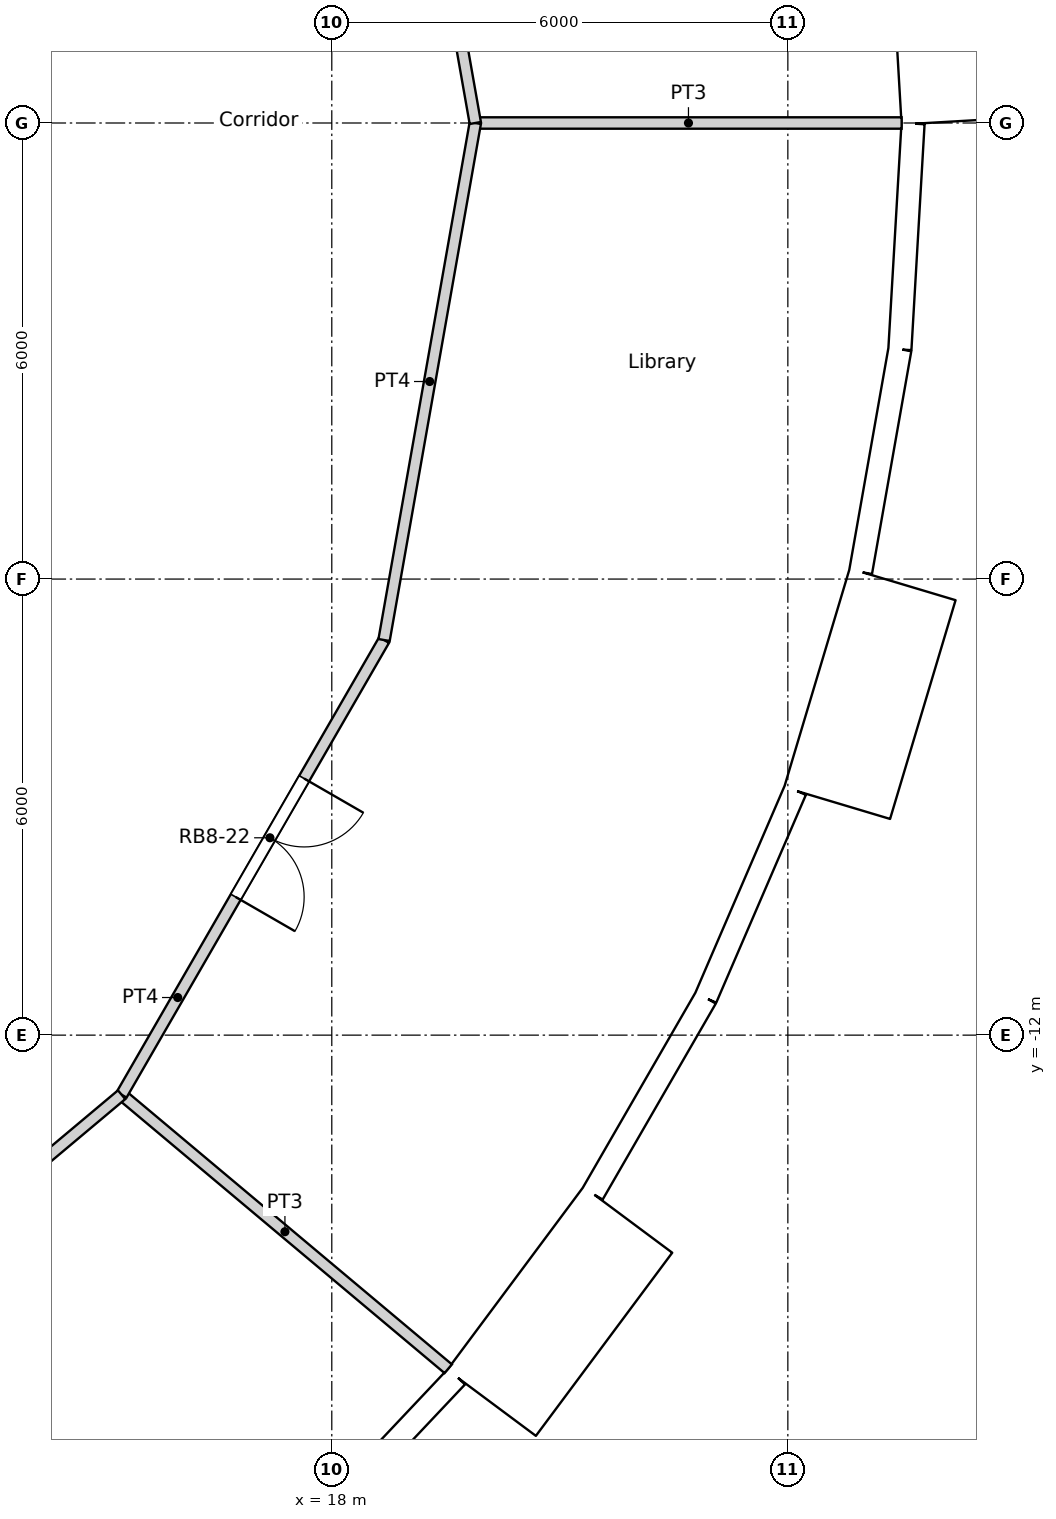
"""IFC4 building model, lengths in metres.
Left out: names, types, materials, properties, quantities, classifications, styles, units other than length and angle.
Written with IfcOpenShell. Run it as: python <this file> out.ifc"""

import sys

from ifc_helpers import new_model, si_unit, direction, frame, frame_2d, origin, origin_2d, place, context, subcontext, project, spatial, rectangle, circle, extrude, element, fill, save


model = new_model("IFC4")
c1 = context("Model", 3, precision=1e-05, world=origin(), true_north=direction((0.0, 1.0)))
c2 = subcontext(c1, "Body", "Model", "MODEL_VIEW")
j1 = project(units=[si_unit("LENGTHUNIT", "METRE"), si_unit("PLANEANGLEUNIT", "RADIAN")], contexts=[c1])
p1 = place(None, origin())
s1 = spatial("IfcSite", under=j1, at=p1, CompositionType="ELEMENT")
p2 = place(p1, origin())
s2 = spatial("IfcBuilding", under=s1, at=p2, CompositionType="ELEMENT")
p3 = place(p2, frame((0.0, 0.0, 201.6)))
s3 = spatial("IfcBuildingStorey", under=s2, at=p3, CompositionType="ELEMENT", Elevation=201.6)
for number, where, z_axis, x_axis in (
    (1, (24.548, 0.0, 0.0), (0.0, 0.0, 1.0), (1.0, 0.0, 0.0)),
    (2, (18.805, -15.779, 0.0), (0.0, 0.0, 1.0), (1.0, 0.0, 0.0)),
    (3, (21.937, -11.017, 0.0), (0.0, 0.0, 1.0), (1.0, 0.0, 0.0)),
    (4, (23.886, -5.661, 0.0), (0.0, 0.0, 1.0), (1.0, 0.0, 0.0)),
):
    element("IfcColumn", number, at=place(p3, frame(where, z_axis=z_axis, x_axis=x_axis)), inside=s3, PredefinedType="COLUMN", context=c2, shape_type="SweptSolid", body=[
        extrude(circle(Radius=0.6, at=origin_2d()), origin(), (0.0, 0.0, 1.0), 3.6),
    ])
for number, where, z_axis, x_axis in (
    (5, (18.822, 0.0, 0.0), (0.0, 0.0, 1.0), (1.0, 0.0, 0.0)),
    (6, (15.552, -10.603, 0.0), (0.0, 0.0, 1.0), (1.0, 0.0, 0.0)),
    (7, (17.986, -5.548, 0.0), (0.0, 0.0, 1.0), (1.0, 0.0, 0.0)),
):
    element("IfcColumn", number, at=place(p3, frame(where, z_axis=z_axis, x_axis=x_axis)), inside=s3, PredefinedType="COLUMN", context=c2, shape_type="SweptSolid", body=[
        extrude(circle(Radius=0.65, at=origin_2d()), origin(), (0.0, 0.0, 1.0), 3.6),
    ])
p4 = place(p3, frame((26.222, 0.025, -0.3), z_axis=(0.0, 0.0, 1.0), x_axis=(-0.058106596105, 0.998310384344, 0.0)))
e8 = element("IfcWall", 8, at=p4, inside=s3, PredefinedType="ELEMENTEDWALL", context=c2, shape_type="SweptSolid", body=[
    extrude(rectangle(XDim=3.0, YDim=1.45, at=frame_2d((1.5, 0.0))), origin(), (0.0, 0.0, 1.0), 3.6),
])
p5 = place(p4, frame((1.5, 0.0, 1.85)))
e9 = element("IfcOpeningElement", 9, at=p5, cuts=e8, PredefinedType="OPENING", context=c2, shape_type="SweptSolid", body=[
    extrude(circle(Radius=0.9, at=origin_2d()), frame((0.0, 0.735, 0.0), z_axis=(0.0, -1.0, 0.0), x_axis=(1.0, 0.0, 0.0)), (0.0, 0.0, 1.0), 1.47),
])
p6 = place(p3, frame((17.6, -18.655, 0.0), z_axis=(0.0, 0.0, 1.0), x_axis=(0.686235184166, 0.727379730273, 0.0)))
e10 = element("IfcWall", 10, at=p6, inside=s3, PredefinedType="SOLIDWALL", context=c2, shape_type="SweptSolid", body=[
    extrude(rectangle(XDim=2.973, YDim=0.3, at=frame_2d((1.486, 0.0))), origin(), (0.0, 0.0, 1.0), 3.3),
])
p7 = place(p6, frame((1.486, 0.0, 1.55)))
e11 = element("IfcOpeningElement", 11, at=p7, cuts=e10, PredefinedType="OPENING", context=c2, shape_type="SweptSolid", body=[
    extrude(circle(Radius=0.9, at=origin_2d()), frame((0.0, 0.16, 0.0), z_axis=(0.0, -1.0, 0.0), x_axis=(1.0, 0.0, 0.0)), (0.0, 0.0, 1.0), 0.32),
])
p8 = place(p3, frame((20.103, -16.836, -0.3), z_axis=(0.0, 0.0, 1.0), x_axis=(0.597183717734, 0.802104486506, 0.0)))
e12 = element("IfcWall", 12, at=p8, inside=s3, PredefinedType="ELEMENTEDWALL", context=c2, shape_type="SweptSolid", body=[
    extrude(rectangle(XDim=3.0, YDim=1.45, at=frame_2d((1.5, 0.0))), origin(), (0.0, 0.0, 1.0), 3.6),
])
p9 = place(p8, frame((1.5, 0.0, 1.85)))
e13 = element("IfcOpeningElement", 13, at=p9, cuts=e12, PredefinedType="OPENING", context=c2, shape_type="SweptSolid", body=[
    extrude(circle(Radius=0.9, at=origin_2d()), frame((0.0, 0.735, 0.0), z_axis=(0.0, -1.0, 0.0), x_axis=(1.0, 0.0, 0.0)), (0.0, 0.0, 1.0), 1.47),
])
p10 = place(p3, frame((21.433, -14.085, 0.0), z_axis=(0.0, 0.0, 1.0), x_axis=(0.500016263033, 0.866016014115, 0.0)))
e14 = element("IfcWall", 14, at=p10, inside=s3, PredefinedType="SOLIDWALL", context=c2, shape_type="SweptSolid", body=[
    extrude(rectangle(XDim=2.973, YDim=0.3, at=frame_2d((1.487, 0.0))), origin(), (0.0, 0.0, 1.0), 3.3),
])
p11 = place(p10, frame((1.486, 0.0, 1.55)))
e15 = element("IfcOpeningElement", 15, at=p11, cuts=e14, PredefinedType="OPENING", context=c2, shape_type="SweptSolid", body=[
    extrude(circle(Radius=0.9, at=origin_2d()), frame((0.0, 0.16, 0.0), z_axis=(0.0, -1.0, 0.0), x_axis=(1.0, 0.0, 0.0)), (0.0, 0.0, 1.0), 0.32),
])
p12 = place(p3, frame((22.919, -11.51, 0.0), z_axis=(0.0, 0.0, 1.0), x_axis=(0.396078892785, 0.918216483565, 0.0)))
e16 = element("IfcWall", 16, at=p12, inside=s3, PredefinedType="SOLIDWALL", context=c2, shape_type="SweptSolid", body=[
    extrude(rectangle(XDim=2.973, YDim=0.3, at=frame_2d((1.486, 0.0))), origin(), (0.0, 0.0, 1.0), 3.3),
])
p13 = place(p12, frame((1.486, 0.0, 1.55)))
e17 = element("IfcOpeningElement", 17, at=p13, cuts=e16, PredefinedType="OPENING", context=c2, shape_type="SweptSolid", body=[
    extrude(circle(Radius=0.9, at=origin_2d()), frame((0.0, 0.16, 0.0), z_axis=(0.0, -1.0, 0.0), x_axis=(1.0, 0.0, 0.0)), (0.0, 0.0, 1.0), 0.32),
])
p14 = place(p3, frame((24.649, -8.945, -0.3), z_axis=(0.0, 0.0, 1.0), x_axis=(0.286780420304, 0.957996341606, 0.0)))
e18 = element("IfcWall", 18, at=p14, inside=s3, PredefinedType="ELEMENTEDWALL", context=c2, shape_type="SweptSolid", body=[
    extrude(rectangle(XDim=3.0, YDim=1.45, at=frame_2d((1.5, 0.0))), origin(), (0.0, 0.0, 1.0), 3.6),
])
p15 = place(p14, frame((1.5, 0.0, 1.85)))
e19 = element("IfcOpeningElement", 19, at=p15, cuts=e18, PredefinedType="OPENING", context=c2, shape_type="SweptSolid", body=[
    extrude(circle(Radius=0.9, at=origin_2d()), frame((0.0, 0.735, 0.0), z_axis=(0.0, -1.0, 0.0), x_axis=(1.0, 0.0, 0.0)), (0.0, 0.0, 1.0), 1.47),
])
p16 = place(p3, frame((24.958, -5.905, 0.0), z_axis=(0.0, 0.0, 1.0), x_axis=(0.173686952598, 0.984800915159, 0.0)))
e20 = element("IfcWall", 20, at=p16, inside=s3, PredefinedType="SOLIDWALL", context=c2, shape_type="SweptSolid", body=[
    extrude(rectangle(XDim=2.973, YDim=0.3, at=frame_2d((1.486, 0.0))), origin(), (0.0, 0.0, 1.0), 3.3),
])
p17 = place(p16, frame((1.486, 0.0, 1.55)))
e21 = element("IfcOpeningElement", 21, at=p17, cuts=e20, PredefinedType="OPENING", context=c2, shape_type="SweptSolid", body=[
    extrude(circle(Radius=0.9, at=origin_2d()), frame((0.0, 0.16, 0.0), z_axis=(0.0, -1.0, 0.0), x_axis=(1.0, 0.0, 0.0)), (0.0, 0.0, 1.0), 0.32),
])
p18 = place(p3, frame((25.474, -2.978, 0.0), z_axis=(0.0, 0.0, 1.0), x_axis=(0.058139540521, 0.998308466271, 0.0)))
e22 = element("IfcWall", 22, at=p18, inside=s3, PredefinedType="SOLIDWALL", context=c2, shape_type="SweptSolid", body=[
    extrude(rectangle(XDim=2.973, YDim=0.3, at=frame_2d((1.487, 0.0))), origin(), (0.0, 0.0, 1.0), 3.3),
])
p19 = place(p18, frame((1.486, 0.0, 1.55)))
e23 = element("IfcOpeningElement", 23, at=p19, cuts=e22, PredefinedType="OPENING", context=c2, shape_type="SweptSolid", body=[
    extrude(circle(Radius=0.9, at=origin_2d()), frame((0.0, 0.16, 0.0), z_axis=(0.0, -1.0, 0.0), x_axis=(1.0, 0.0, 0.0)), (0.0, 0.0, 1.0), 0.32),
])
p20 = place(p3, frame((18.688, 6.802, 0.0), z_axis=(0.0, 0.0, 1.0), x_axis=(0.173728873845, -0.98479352069, 0.0)))
e24 = element("IfcWall", 24, at=p20, inside=s3, PredefinedType="PARTITIONING", context=c2, shape_type="SweptSolid", body=[
    extrude(rectangle(XDim=6.907, YDim=0.15, at=frame_2d((3.454, 0.0))), origin(), (0.0, 0.0, 1.0), 3.3),
])
p21 = place(p3, frame((9.943, -17.222, 0.0), z_axis=(0.0, 0.0, 1.0), x_axis=(0.766192104565, 0.642611592567, 0.0)))
e25 = element("IfcWall", 25, at=p21, inside=s3, PredefinedType="PARTITIONING", context=c2, shape_type="SweptSolid", body=[
    extrude(rectangle(XDim=6.906, YDim=0.15, at=frame_2d((3.453, 0.0))), origin(), (0.0, 0.0, 1.0), 3.3),
])
p22 = place(p3, frame((18.688, -6.802, 0.0), z_axis=(0.0, 0.0, 1.0), x_axis=(0.173728873845, 0.98479352069, 0.0)))
e26 = element("IfcWall", 26, at=p22, inside=s3, PredefinedType="PARTITIONING", context=c2, shape_type="SweptSolid", body=[
    extrude(rectangle(XDim=6.907, YDim=0.15, at=frame_2d((3.454, 0.0))), origin(), (0.0, 0.0, 1.0), 3.3),
])
p23 = place(p3, frame((15.235, -12.784, 0.0), z_axis=(0.0, 0.0, 1.0), x_axis=(0.499914202267, 0.866074933462, 0.0)))
e27 = element("IfcWall", 27, at=p23, inside=s3, PredefinedType="PARTITIONING", context=c2, shape_type="SweptSolid", body=[
    extrude(rectangle(XDim=6.907, YDim=0.15, at=frame_2d((3.454, 0.0))), origin(), (0.0, 0.0, 1.0), 3.3),
])
p24 = place(p23, frame((3.003, 0.0, 0.0)))
e28 = element("IfcOpeningElement", 28, at=p24, cuts=e27, PredefinedType="OPENING", context=c2, shape_type="SweptSolid", body=[
    extrude(rectangle(XDim=1.8, YDim=2.1, at=frame_2d((0.9, 1.05))), frame((0.0, 0.075, 0.0), z_axis=(0.0, -1.0, 0.0), x_axis=(1.0, 0.0, 0.0)), (0.0, 0.0, 1.0), 0.15),
])
p25 = place(p3, frame((19.888, 0.0, 0.0), z_axis=(0.0, 0.0, 1.0), x_axis=(1.0, 0.0, 0.0)))
e29 = element("IfcWall", 29, at=p25, inside=s3, PredefinedType="PARTITIONING", context=c2, shape_type="SweptSolid", body=[
    extrude(rectangle(XDim=5.609, YDim=0.15, at=frame_2d((2.805, 0.0))), origin(), (0.0, 0.0, 1.0), 3.3),
])
p26 = place(p3, frame((15.235, -12.784, 0.0), z_axis=(0.0, 0.0, 1.0), x_axis=(0.76609059793, -0.642732600514, 0.0)))
e30 = element("IfcWall", 30, at=p26, inside=s3, PredefinedType="PARTITIONING", context=c2, shape_type="SweptSolid", body=[
    extrude(rectangle(XDim=5.609, YDim=0.15, at=frame_2d((2.804, 0.0))), origin(), (0.0, 0.0, 1.0), 3.3),
])
p27 = place(p5, origin())
e31 = element("IfcWindow", 31, at=p27, inside=s3, PartitioningType="SINGLE_PANEL", PredefinedType="WINDOW", context=c2, shape_type="SweptSolid", body=[
    extrude(circle(Radius=0.9, at=origin_2d()), frame((0.0, 0.695, 0.0), z_axis=(0.0, -1.0, 0.0), x_axis=(1.0, 0.0, 0.0)), (0.0, 0.0, 1.0), 0.1),
])
fill(e9, e31)
p28 = place(p7, origin())
e32 = element("IfcWindow", 32, at=p28, inside=s3, PartitioningType="SINGLE_PANEL", PredefinedType="WINDOW", context=c2, shape_type="SweptSolid", body=[
    extrude(circle(Radius=0.9, at=origin_2d()), frame((0.0, 0.12, 0.0), z_axis=(0.0, -1.0, 0.0), x_axis=(1.0, 0.0, 0.0)), (0.0, 0.0, 1.0), 0.1),
])
fill(e11, e32)
p29 = place(p9, origin())
e33 = element("IfcWindow", 33, at=p29, inside=s3, PartitioningType="SINGLE_PANEL", PredefinedType="WINDOW", context=c2, shape_type="SweptSolid", body=[
    extrude(circle(Radius=0.9, at=origin_2d()), frame((0.0, 0.695, 0.0), z_axis=(0.0, -1.0, 0.0), x_axis=(1.0, 0.0, 0.0)), (0.0, 0.0, 1.0), 0.1),
])
fill(e13, e33)
p30 = place(p11, origin())
e34 = element("IfcWindow", 34, at=p30, inside=s3, PartitioningType="SINGLE_PANEL", PredefinedType="WINDOW", context=c2, shape_type="SweptSolid", body=[
    extrude(circle(Radius=0.9, at=origin_2d()), frame((0.0, 0.12, 0.0), z_axis=(0.0, -1.0, 0.0), x_axis=(1.0, 0.0, 0.0)), (0.0, 0.0, 1.0), 0.1),
])
fill(e15, e34)
p31 = place(p13, origin())
e35 = element("IfcWindow", 35, at=p31, inside=s3, PartitioningType="SINGLE_PANEL", PredefinedType="WINDOW", context=c2, shape_type="SweptSolid", body=[
    extrude(circle(Radius=0.9, at=origin_2d()), frame((0.0, 0.12, 0.0), z_axis=(0.0, -1.0, 0.0), x_axis=(1.0, 0.0, 0.0)), (0.0, 0.0, 1.0), 0.1),
])
fill(e17, e35)
p32 = place(p15, origin())
e36 = element("IfcWindow", 36, at=p32, inside=s3, PartitioningType="SINGLE_PANEL", PredefinedType="WINDOW", context=c2, shape_type="SweptSolid", body=[
    extrude(circle(Radius=0.9, at=origin_2d()), frame((0.0, 0.695, 0.0), z_axis=(0.0, -1.0, 0.0), x_axis=(1.0, 0.0, 0.0)), (0.0, 0.0, 1.0), 0.1),
])
fill(e19, e36)
p33 = place(p17, origin())
e37 = element("IfcWindow", 37, at=p33, inside=s3, PartitioningType="SINGLE_PANEL", PredefinedType="WINDOW", context=c2, shape_type="SweptSolid", body=[
    extrude(circle(Radius=0.9, at=origin_2d()), frame((0.0, 0.12, 0.0), z_axis=(0.0, -1.0, 0.0), x_axis=(1.0, 0.0, 0.0)), (0.0, 0.0, 1.0), 0.1),
])
fill(e21, e37)
p34 = place(p19, origin())
e38 = element("IfcWindow", 38, at=p34, inside=s3, PartitioningType="SINGLE_PANEL", PredefinedType="WINDOW", context=c2, shape_type="SweptSolid", body=[
    extrude(circle(Radius=0.9, at=origin_2d()), frame((0.0, 0.12, 0.0), z_axis=(0.0, -1.0, 0.0), x_axis=(1.0, 0.0, 0.0)), (0.0, 0.0, 1.0), 0.1),
])
fill(e23, e38)
p35 = place(p24, origin())
e39 = element("IfcDoor", 39, at=p35, inside=s3, OperationType="DOUBLE_DOOR_SINGLE_SWING", PredefinedType="DOOR", context=c2, shape_type="SweptSolid", body=[
    extrude(rectangle(XDim=1.8, YDim=2.1, at=frame_2d((0.9, 1.05))), frame((0.0, 0.025, 0.0), z_axis=(0.0, -1.0, 0.0), x_axis=(1.0, 0.0, 0.0)), (0.0, 0.0, 1.0), 0.05),
])
fill(e28, e39)
save(model, sys.argv[1])
